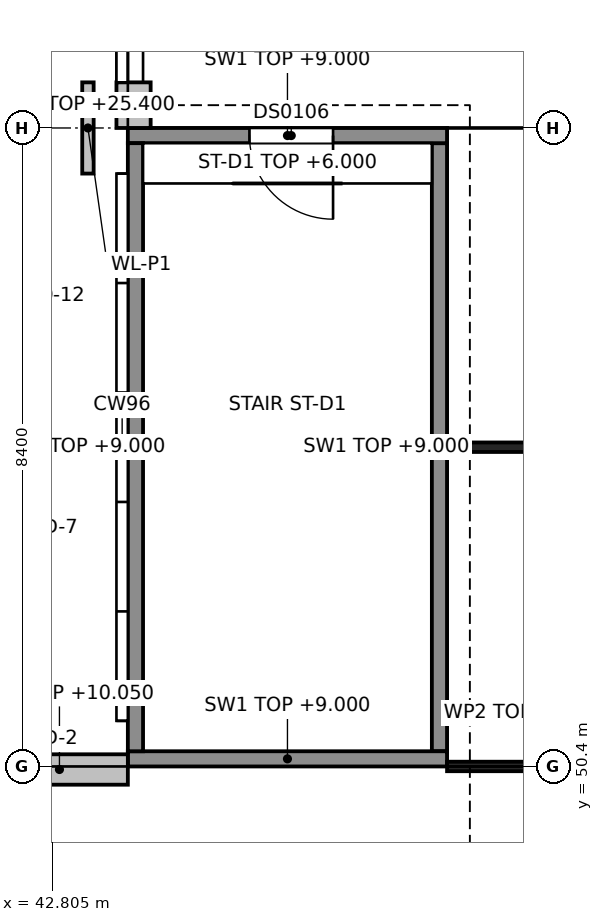
"""IFC4 building model, lengths in metres.
Left out: names, types, materials, properties, quantities, classifications, styles, units other than length and angle.
Written with IfcOpenShell. Run it as: python <this file> out.ifc"""

import sys

from ifc_helpers import new_model, si_unit, direction, frame, frame_2d, origin, place, context, subcontext, project, spatial, rectangle, extrude, element, fill, save


model = new_model("IFC4")
c1 = context("Model", 3, precision=1e-05, world=origin(), true_north=direction((0.0, 1.0)))
c2 = subcontext(c1, "Body", "Model", "MODEL_VIEW")
j1 = project(units=[si_unit("LENGTHUNIT", "METRE"), si_unit("PLANEANGLEUNIT", "RADIAN")], contexts=[c1])
p1 = place(None, origin())
s1 = spatial("IfcSite", under=j1, at=p1, CompositionType="ELEMENT")
p2 = place(p1, origin())
s2 = spatial("IfcBuilding", under=s1, at=p2, CompositionType="ELEMENT")
p3 = place(p2, frame((0.0, 0.0, 6.0)))
s3 = spatial("IfcBuildingStorey", under=s2, at=p3, CompositionType="ELEMENT", Elevation=6.0)
p4 = place(p3, frame((43.8, 50.5, 0.0), z_axis=(0.0, 0.0, 1.0), x_axis=(1.0, 0.0, 0.0)))
e1 = element("IfcWall", 1, at=p4, inside=s3, PredefinedType="SHEAR", context=c2, shape_type="SweptSolid", body=[
    extrude(rectangle(XDim=4.2, YDim=0.2, at=frame_2d((2.1, 0.0))), origin(), (0.0, 0.0, 1.0), 3.0),
])
p5 = place(p3, frame((43.8, 58.7, 0.0), z_axis=(0.0, 0.0, 1.0), x_axis=(1.0, 0.0, 0.0)))
e2 = element("IfcWall", 2, at=p5, inside=s3, PredefinedType="SHEAR", context=c2, shape_type="SweptSolid", body=[
    extrude(rectangle(XDim=4.2, YDim=0.2, at=frame_2d((2.1, 0.0))), origin(), (0.0, 0.0, 1.0), 3.0),
])
p6 = place(p5, frame((1.6, 0.0, 0.0)))
e3 = element("IfcOpeningElement", 3, at=p6, cuts=e2, PredefinedType="OPENING", context=c2, shape_type="SweptSolid", body=[
    extrude(rectangle(XDim=1.1, YDim=2.1, at=frame_2d((0.55, 1.05))), frame((0.0, 0.1, 0.0), z_axis=(0.0, -1.0, 0.0), x_axis=(1.0, 0.0, 0.0)), (0.0, 0.0, 1.0), 0.2),
])
for number, where, z_axis, x_axis in (
    (4, (43.9, 50.6, 0.0), (0.0, 0.0, 1.0), (0.0, 1.0, 0.0)),
    (5, (47.9, 50.6, 0.0), (0.0, 0.0, 1.0), (0.0, 1.0, 0.0)),
):
    element("IfcWall", number, at=place(p3, frame(where, z_axis=z_axis, x_axis=x_axis)), inside=s3, PredefinedType="SHEAR", context=c2, shape_type="SweptSolid", body=[
        extrude(rectangle(XDim=8.0, YDim=0.2, at=frame_2d((4.0, 0.0))), origin(), (0.0, 0.0, 1.0), 3.0),
    ])
p7 = place(p3, frame((42.0, 50.36, 0.0), z_axis=(0.0, 0.0, 1.0), x_axis=(1.0, 0.0, 0.0)))
e6 = element("IfcWall", 6, at=p7, inside=s3, PredefinedType="SOLIDWALL", context=c2, shape_type="SweptSolid", body=[
    extrude(rectangle(XDim=1.8, YDim=0.4, at=frame_2d((0.9, 0.0))), origin(), (0.0, 0.0, 1.0), 4.05),
])
p8 = place(p3, frame((43.825, 59.4, 0.0), z_axis=(0.0, 0.0, 1.0), x_axis=(0.0, 1.0, 0.0)))
e7 = element("IfcWall", 7, at=p8, inside=s3, PredefinedType="SOLIDWALL", context=c2, shape_type="SweptSolid", body=[
    extrude(rectangle(XDim=7.2, YDim=0.35, at=frame_2d((3.6, 0.0))), origin(), (0.0, 0.0, 1.0), 0.9),
])
p9 = place(p3, frame((43.875, 58.8, 0.0), z_axis=(0.0, 0.0, 1.0), x_axis=(0.0, 1.0, 0.0)))
e8 = element("IfcWall", 8, at=p9, inside=s3, PredefinedType="SOLIDWALL", context=c2, shape_type="SweptSolid", body=[
    extrude(rectangle(XDim=0.6, YDim=0.45, at=frame_2d((0.3, 0.0))), origin(), (0.0, 0.0, 1.0), 19.4),
])
p10 = place(p3, frame((43.275, 58.2, 0.0), z_axis=(0.0, 0.0, 1.0), x_axis=(0.0, 1.0, 0.0)))
e9 = element("IfcWall", 9, at=p10, inside=s3, PredefinedType="SOLIDWALL", context=c2, shape_type="SweptSolid", body=[
    extrude(rectangle(XDim=1.2, YDim=0.15, at=frame_2d((0.6, 0.0))), origin(), (0.0, 0.0, 1.0), 4.8),
])
p11 = place(p3, frame((48.0, 50.4, 0.0), z_axis=(0.0, 0.0, 1.0), x_axis=(1.0, 0.0, 0.0)))
e10 = element("IfcWall", 10, at=p11, inside=s3, PredefinedType="PARTITIONING", context=c2, shape_type="SweptSolid", body=[
    extrude(rectangle(XDim=2.25, YDim=0.125, at=frame_2d((1.125, 0.0))), origin(), (0.0, 0.0, 1.0), 4.25),
])
p12 = place(p3, frame((48.0, 54.6, 0.0), z_axis=(0.0, 0.0, 1.0), x_axis=(1.0, 0.0, 0.0)))
e11 = element("IfcWall", 11, at=p12, inside=s3, PredefinedType="PARTITIONING", context=c2, shape_type="SweptSolid", body=[
    extrude(rectangle(XDim=15.0, YDim=0.125, at=frame_2d((7.5, 0.0))), origin(), (0.0, 0.0, 1.0), 4.67),
])
p13 = place(p12, frame((6.55, 0.0, 0.0)))
e12 = element("IfcOpeningElement", 12, at=p13, cuts=e11, PredefinedType="OPENING", context=c2, shape_type="SweptSolid", body=[
    extrude(rectangle(XDim=1.8, YDim=2.1, at=frame_2d((0.9, 1.05))), frame((0.0, 0.062, 0.0), z_axis=(0.0, -1.0, 0.0), x_axis=(1.0, 0.0, 0.0)), (0.0, 0.0, 1.0), 0.125),
])
p14 = place(p6, origin())
e13 = element("IfcDoor", 13, at=p14, inside=s3, OperationType="SINGLE_SWING_RIGHT", PredefinedType="DOOR", context=c2, shape_type="SweptSolid", body=[
    extrude(rectangle(XDim=1.1, YDim=2.1, at=frame_2d((0.55, 1.05))), frame((0.0, 0.025, 0.0), z_axis=(0.0, -1.0, 0.0), x_axis=(1.0, 0.0, 0.0)), (0.0, 0.0, 1.0), 0.05),
])
fill(e3, e13)
save(model, sys.argv[1])
